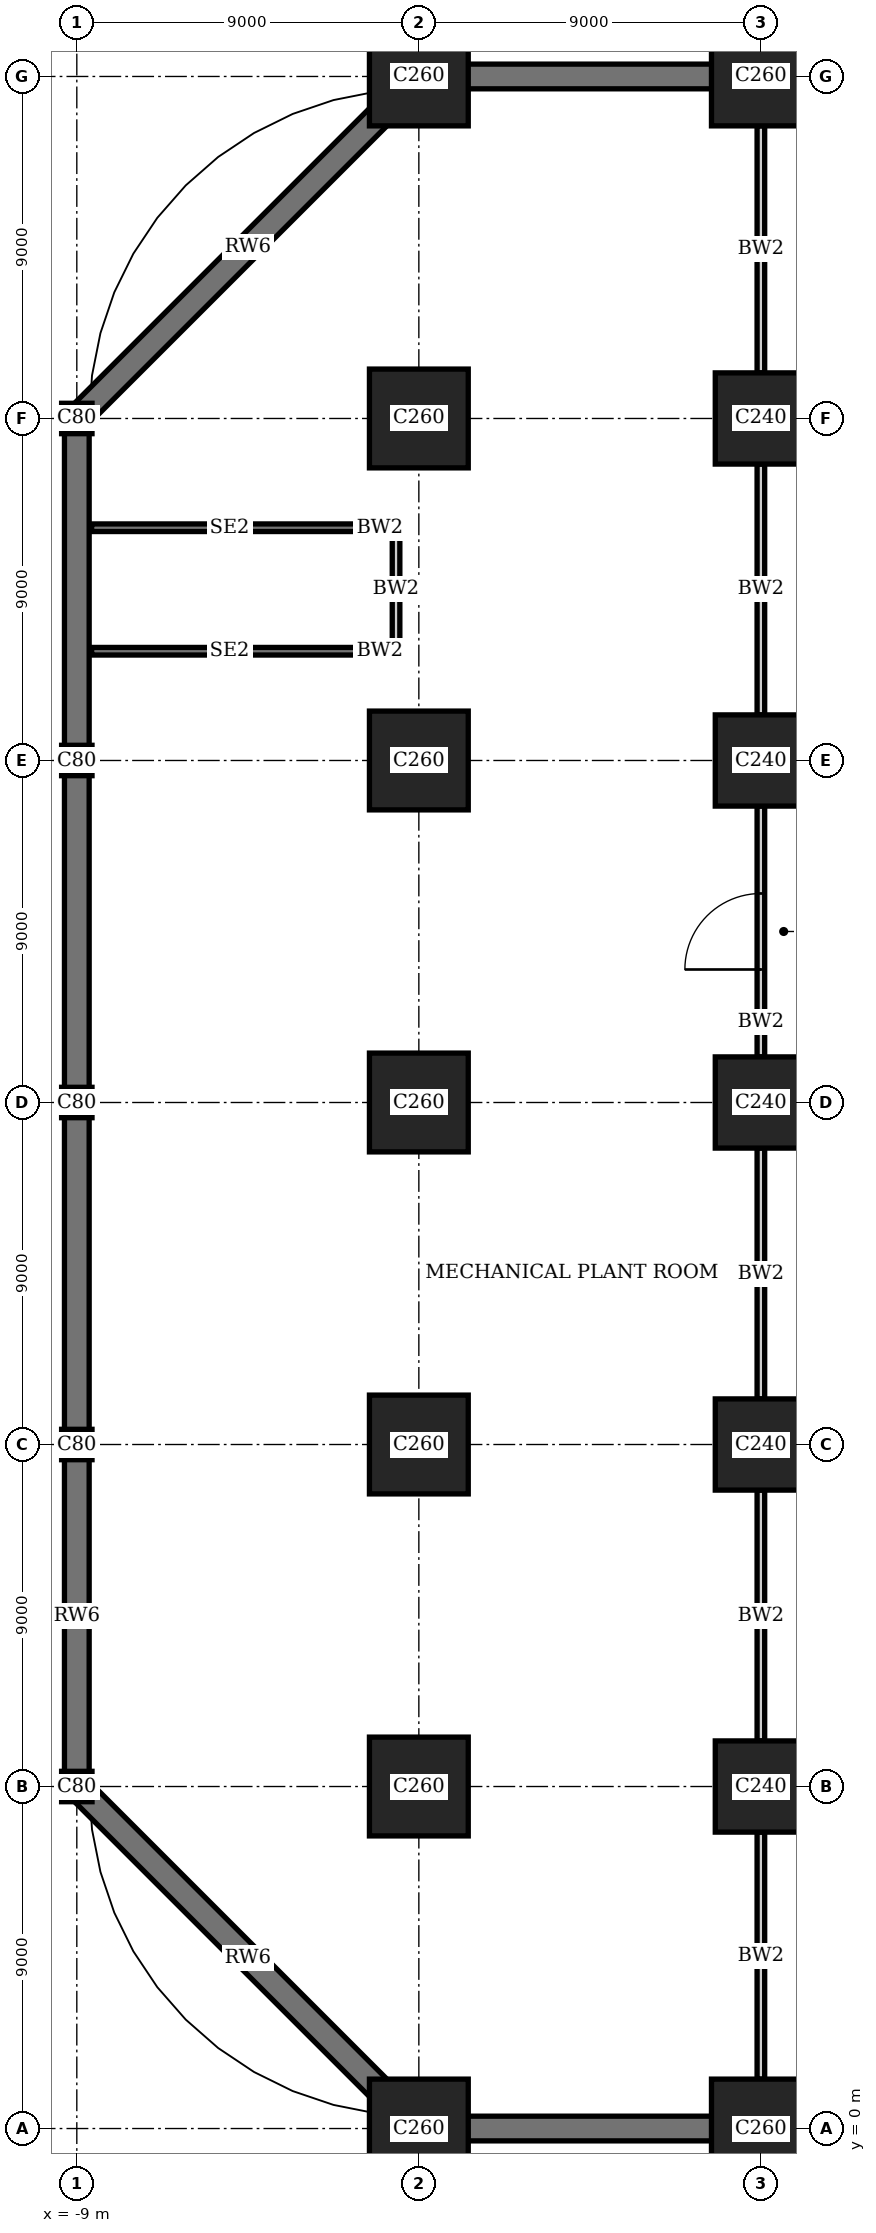
"""IFC4 building model, lengths in metres.
Left out: names, types, materials, properties, quantities, classifications, styles, units other than length and angle.
Written with IfcOpenShell. Run it as: python <this file> out.ifc"""

import sys

from ifc_helpers import new_model, si_unit, direction, frame, frame_2d, origin, origin_2d, place, context, subcontext, project, spatial, rectangle, extrude, element, fill, save


model = new_model("IFC4")
c1 = context("Model", 3, precision=1e-05, world=origin(), true_north=direction((0.0, 1.0)))
c2 = subcontext(c1, "Body", "Model", "MODEL_VIEW")
j1 = project(units=[si_unit("LENGTHUNIT", "METRE"), si_unit("PLANEANGLEUNIT", "RADIAN")], contexts=[c1])
p1 = place(None, origin())
s1 = spatial("IfcSite", under=j1, at=p1, CompositionType="ELEMENT")
p2 = place(p1, origin())
s2 = spatial("IfcBuilding", under=s1, at=p2, CompositionType="ELEMENT")
p3 = place(p2, frame((0.0, 0.0, -5.0)))
s3 = spatial("IfcBuildingStorey", under=s2, at=p3, CompositionType="ELEMENT", Elevation=-5.0)
for number, where, z_axis, x_axis in (
    (1, (-9.0, 9.0, -0.45), (0.0, 0.0, 1.0), (1.0, 0.0, 0.0)),
    (2, (-9.0, 18.0, -0.45), (0.0, 0.0, 1.0), (1.0, 0.0, 0.0)),
    (3, (-9.0, 27.0, -0.45), (0.0, 0.0, 1.0), (1.0, 0.0, 0.0)),
    (4, (-9.0, 36.0, -0.45), (0.0, 0.0, 1.0), (1.0, 0.0, 0.0)),
    (5, (-9.0, 45.0, -0.45), (0.0, 0.0, 1.0), (1.0, 0.0, 0.0)),
):
    element("IfcColumn", number, at=place(p3, frame(where, z_axis=z_axis, x_axis=x_axis)), inside=s3, PredefinedType="COLUMN", context=c2, shape_type="SweptSolid", body=[
        extrude(rectangle(XDim=0.8, YDim=0.8, at=origin_2d()), origin(), (0.0, 0.0, 1.0), 5.45),
    ])
for number, where, z_axis, x_axis in (
    (6, (0.0, 0.0, -0.45), (0.0, 0.0, 1.0), (1.0, 0.0, 0.0)),
    (7, (0.0, 9.0, -0.45), (0.0, 0.0, 1.0), (1.0, 0.0, 0.0)),
    (8, (0.0, 18.0, -0.45), (0.0, 0.0, 1.0), (1.0, 0.0, 0.0)),
    (9, (0.0, 27.0, -0.45), (0.0, 0.0, 1.0), (1.0, 0.0, 0.0)),
    (10, (0.0, 36.0, -0.45), (0.0, 0.0, 1.0), (1.0, 0.0, 0.0)),
    (11, (0.0, 45.0, -0.45), (0.0, 0.0, 1.0), (1.0, 0.0, 0.0)),
    (12, (0.0, 54.0, -0.45), (0.0, 0.0, 1.0), (1.0, 0.0, 0.0)),
    (13, (9.0, 0.0, -0.45), (0.0, 0.0, 1.0), (1.0, 0.0, 0.0)),
):
    element("IfcColumn", number, at=place(p3, frame(where, z_axis=z_axis, x_axis=x_axis)), inside=s3, PredefinedType="COLUMN", context=c2, shape_type="SweptSolid", body=[
        extrude(rectangle(XDim=2.6, YDim=2.6, at=origin_2d()), origin(), (0.0, 0.0, 1.0), 5.45),
    ])
for number, where, z_axis, x_axis in (
    (14, (9.0, 9.0, -0.45), (0.0, 0.0, 1.0), (1.0, 0.0, 0.0)),
    (15, (9.0, 18.0, -0.45), (0.0, 0.0, 1.0), (1.0, 0.0, 0.0)),
    (16, (9.0, 27.0, -0.45), (0.0, 0.0, 1.0), (1.0, 0.0, 0.0)),
    (17, (9.0, 36.0, -0.45), (0.0, 0.0, 1.0), (1.0, 0.0, 0.0)),
    (18, (9.0, 45.0, -0.45), (0.0, 0.0, 1.0), (1.0, 0.0, 0.0)),
):
    element("IfcColumn", number, at=place(p3, frame(where, z_axis=z_axis, x_axis=x_axis)), inside=s3, PredefinedType="COLUMN", context=c2, shape_type="SweptSolid", body=[
        extrude(rectangle(XDim=2.4, YDim=2.4, at=origin_2d()), origin(), (0.0, 0.0, 1.0), 5.45),
    ])
p4 = place(p3, frame((9.0, 54.0, -0.45), z_axis=(0.0, 0.0, 1.0), x_axis=(1.0, 0.0, 0.0)))
e19 = element("IfcColumn", 19, at=p4, inside=s3, PredefinedType="COLUMN", context=c2, shape_type="SweptSolid", body=[
    extrude(rectangle(XDim=2.6, YDim=2.6, at=origin_2d()), origin(), (0.0, 0.0, 1.0), 5.45),
])
for number, where, z_axis, x_axis in (
    (20, (0.0, 0.0, -0.45), (0.0, 0.0, 1.0), (1.0, 0.0, 0.0)),
    (21, (63.0, 54.0, -0.45), (0.0, 0.0, 1.0), (-1.0, 0.0, 0.0)),
):
    element("IfcWall", number, at=place(p3, frame(where, z_axis=z_axis, x_axis=x_axis)), inside=s3, PredefinedType="SOLIDWALL", context=c2, shape_type="SweptSolid", body=[
        extrude(rectangle(XDim=63.0, YDim=0.65, at=frame_2d((31.5, 0.0))), origin(), (0.0, 0.0, 1.0), 5.45),
    ])
p5 = place(p3, frame((-9.0, 45.0, -0.45), z_axis=(0.0, 0.0, 1.0), x_axis=(0.0, -1.0, 0.0)))
e22 = element("IfcWall", 22, at=p5, inside=s3, PredefinedType="SOLIDWALL", context=c2, shape_type="SweptSolid", body=[
    extrude(rectangle(XDim=36.0, YDim=0.65, at=frame_2d((18.0, 0.0))), origin(), (0.0, 0.0, 1.0), 5.45),
])
for number, where, z_axis, x_axis in (
    (23, (0.0, 54.0, -0.45), (0.0, 0.0, 1.0), (-0.707, -0.707, 0.0)),
    (24, (-9.0, 9.0, -0.45), (0.0, 0.0, 1.0), (0.707, -0.707, 0.0)),
):
    element("IfcWall", number, at=place(p3, frame(where, z_axis=z_axis, x_axis=x_axis)), inside=s3, PredefinedType="SOLIDWALL", context=c2, shape_type="SweptSolid", body=[
        extrude(rectangle(XDim=12.728, YDim=0.65, at=frame_2d((6.364, 0.0))), origin(), (0.0, 0.0, 1.0), 5.45),
    ])
p6 = place(p3, frame((9.0, 1.3, 0.0), z_axis=(0.0, 0.0, 1.0), x_axis=(0.0, 1.0, 0.0)))
e25 = element("IfcWall", 25, at=p6, inside=s3, PredefinedType="SOLIDWALL", context=c2, shape_type="SweptSolid", body=[
    extrude(rectangle(XDim=6.5, YDim=0.2, at=frame_2d((3.25, 0.0))), origin(), (0.0, 0.0, 1.0), 3.9),
])
for number, where, z_axis, x_axis in (
    (26, (9.0, 10.2, 0.0), (0.0, 0.0, 1.0), (0.0, 1.0, 0.0)),
    (27, (9.0, 19.2, 0.0), (0.0, 0.0, 1.0), (0.0, 1.0, 0.0)),
):
    element("IfcWall", number, at=place(p3, frame(where, z_axis=z_axis, x_axis=x_axis)), inside=s3, PredefinedType="SOLIDWALL", context=c2, shape_type="SweptSolid", body=[
        extrude(rectangle(XDim=6.6, YDim=0.2, at=frame_2d((3.3, 0.0))), origin(), (0.0, 0.0, 1.0), 3.9),
    ])
p7 = place(p3, frame((9.0, 28.2, 0.0), z_axis=(0.0, 0.0, 1.0), x_axis=(0.0, 1.0, 0.0)))
e28 = element("IfcWall", 28, at=p7, inside=s3, PredefinedType="SOLIDWALL", context=c2, shape_type="SweptSolid", body=[
    extrude(rectangle(XDim=6.6, YDim=0.2, at=frame_2d((3.3, 0.0))), origin(), (0.0, 0.0, 1.0), 3.9),
])
p8 = place(p7, frame((2.3, 0.0, 0.0)))
e29 = element("IfcOpeningElement", 29, at=p8, cuts=e28, PredefinedType="OPENING", context=c2, shape_type="SweptSolid", body=[
    extrude(rectangle(XDim=2.0, YDim=2.7, at=frame_2d((1.0, 1.35))), frame((0.0, 0.11, 0.0), z_axis=(0.0, -1.0, 0.0), x_axis=(1.0, 0.0, 0.0)), (0.0, 0.0, 1.0), 0.22),
])
p9 = place(p3, frame((9.0, 37.2, 0.0), z_axis=(0.0, 0.0, 1.0), x_axis=(0.0, 1.0, 0.0)))
e30 = element("IfcWall", 30, at=p9, inside=s3, PredefinedType="SOLIDWALL", context=c2, shape_type="SweptSolid", body=[
    extrude(rectangle(XDim=6.6, YDim=0.2, at=frame_2d((3.3, 0.0))), origin(), (0.0, 0.0, 1.0), 3.9),
])
p10 = place(p3, frame((9.0, 46.2, 0.0), z_axis=(0.0, 0.0, 1.0), x_axis=(0.0, 1.0, 0.0)))
e31 = element("IfcWall", 31, at=p10, inside=s3, PredefinedType="SOLIDWALL", context=c2, shape_type="SweptSolid", body=[
    extrude(rectangle(XDim=6.5, YDim=0.2, at=frame_2d((3.25, 0.0))), origin(), (0.0, 0.0, 1.0), 3.9),
])
for number, where, z_axis, x_axis in (
    (32, (-8.61, 38.875, -0.45), (0.0, 0.0, 1.0), (1.0, 0.0, 0.0)),
    (33, (-8.61, 42.125, -0.45), (0.0, 0.0, 1.0), (1.0, 0.0, 0.0)),
):
    element("IfcWall", number, at=place(p3, frame(where, z_axis=z_axis, x_axis=x_axis)), inside=s3, PredefinedType="SOLIDWALL", context=c2, shape_type="SweptSolid", body=[
        extrude(rectangle(XDim=7.26, YDim=0.2, at=frame_2d((3.63, 0.0))), origin(), (0.0, 0.0, 1.0), 5.45),
    ])
for number, where, z_axis, x_axis in (
    (34, (-1.35, 38.875, -0.45), (0.0, 0.0, 1.0), (1.0, 0.0, 0.0)),
    (35, (-1.35, 42.125, -0.45), (0.0, 0.0, 1.0), (1.0, 0.0, 0.0)),
):
    element("IfcWall", number, at=place(p3, frame(where, z_axis=z_axis, x_axis=x_axis)), inside=s3, PredefinedType="SOLIDWALL", context=c2, shape_type="SweptSolid", body=[
        extrude(rectangle(XDim=0.65, YDim=0.2, at=frame_2d((0.325, 0.0))), origin(), (0.0, 0.0, 1.0), 5.45),
    ])
p11 = place(p3, frame((-0.6, 38.775, -0.45), z_axis=(0.0, 0.0, 1.0), x_axis=(0.0, 1.0, 0.0)))
e36 = element("IfcWall", 36, at=p11, inside=s3, PredefinedType="SOLIDWALL", context=c2, shape_type="SweptSolid", body=[
    extrude(rectangle(XDim=3.45, YDim=0.2, at=frame_2d((1.725, 0.0))), origin(), (0.0, 0.0, 1.0), 4.35),
])
p12 = place(p8, origin())
e37 = element("IfcDoor", 37, at=p12, inside=s3, OperationType="DOUBLE_DOOR_SINGLE_SWING", PredefinedType="DOOR", context=c2, shape_type="SweptSolid", body=[
    extrude(rectangle(XDim=2.0, YDim=2.7, at=frame_2d((1.0, 1.35))), frame((0.0, 0.03, 0.0), z_axis=(0.0, -1.0, 0.0), x_axis=(1.0, 0.0, 0.0)), (0.0, 0.0, 1.0), 0.06),
])
fill(e29, e37)
save(model, sys.argv[1])
